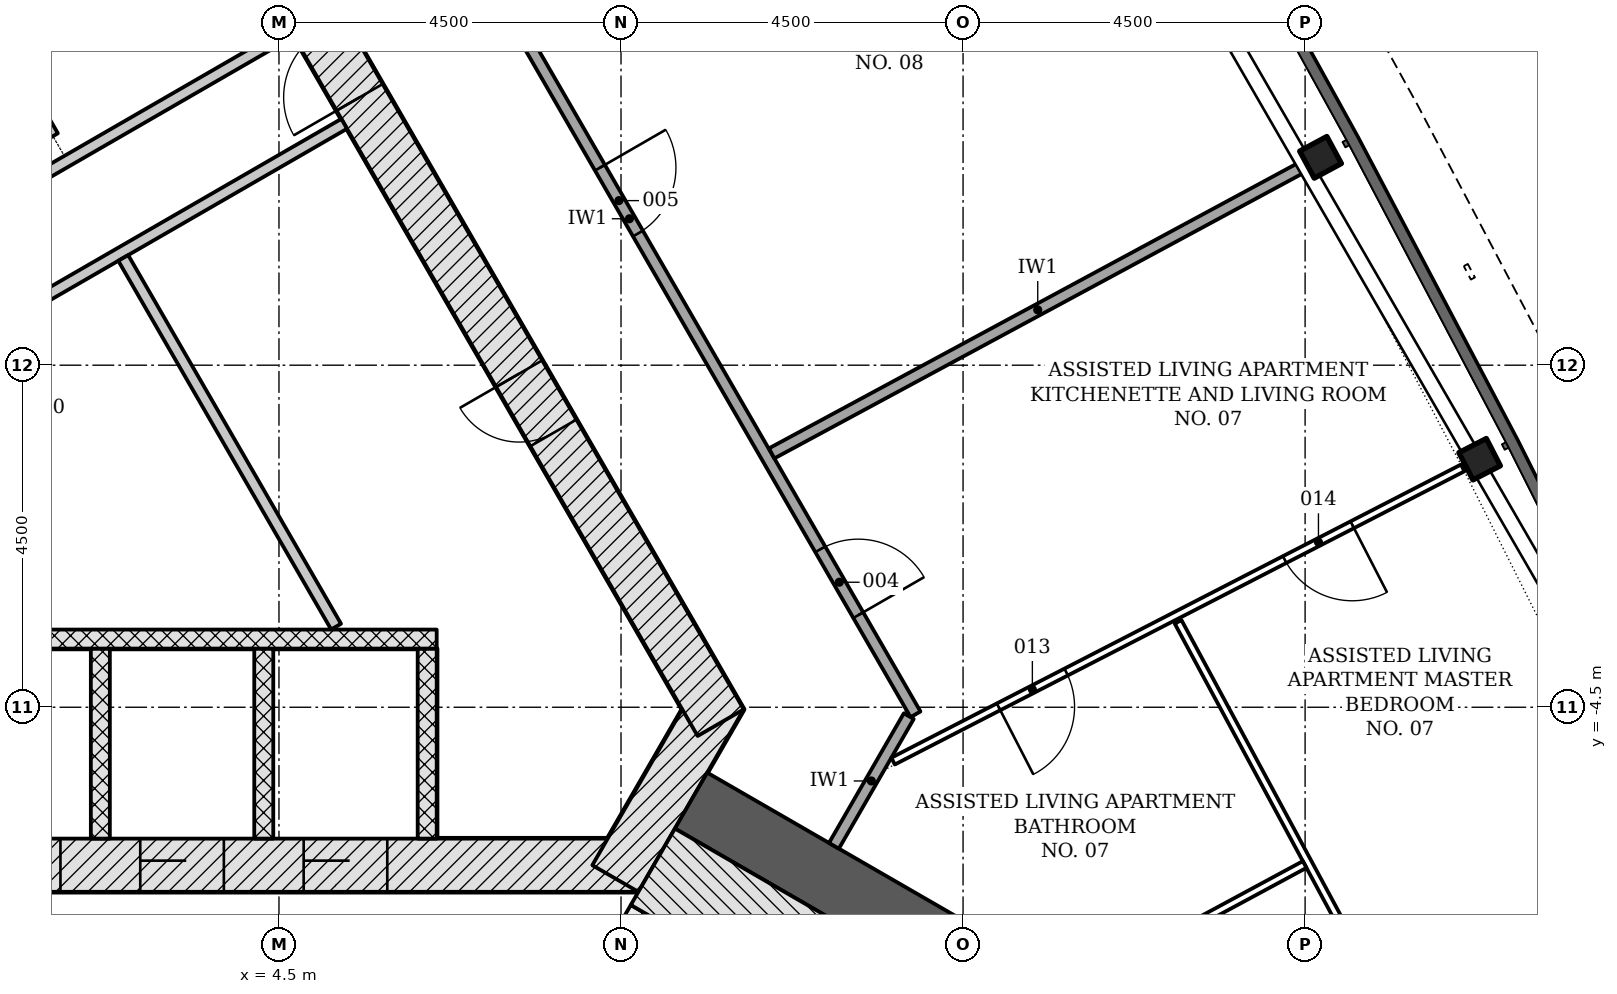
"""IFC4 building model, lengths in metres.
Left out: names, types, materials, properties, quantities, classifications, styles, units other than length and angle.
Written with IfcOpenShell. Run it as: python <this file> out.ifc"""

import sys

from ifc_helpers import new_model, si_unit, direction, frame, frame_2d, origin, origin_2d, place, context, subcontext, project, spatial, rectangle, i_section, extrude, element, fill, save


model = new_model("IFC4")
c1 = context("Model", 3, precision=1e-05, world=origin(), true_north=direction((0.0, 1.0)))
c2 = subcontext(c1, "Body", "Model", "MODEL_VIEW")
j1 = project(units=[si_unit("LENGTHUNIT", "METRE"), si_unit("PLANEANGLEUNIT", "RADIAN")], contexts=[c1])
p1 = place(None, origin())
s1 = spatial("IfcSite", under=j1, at=p1, CompositionType="ELEMENT")
p2 = place(p1, origin())
s2 = spatial("IfcBuilding", under=s1, at=p2, CompositionType="ELEMENT")
p3 = place(p2, frame((0.0, 0.0, 72.6)))
s3 = spatial("IfcBuildingStorey", under=s2, at=p3, CompositionType="ELEMENT", Elevation=72.6)
p4 = place(p3, frame((-9.229, -6.578, -0.2), z_axis=(0.0, 0.0, 1.0), x_axis=(1.0, 0.0, 0.0)))
e1 = element("IfcWall", 1, at=p4, inside=s3, PredefinedType="SHEAR", context=c2, shape_type="SweptSolid", body=[
    extrude(rectangle(XDim=18.458, YDim=0.7, at=frame_2d((9.229, 0.0))), origin(), (0.0, 0.0, 1.0), 3.6),
])
p5 = place(p4, frame((3.304, 0.0, 0.2)))
e2 = element("IfcOpeningElement", 2, at=p5, cuts=e1, PredefinedType="OPENING", context=c2, shape_type="SweptSolid", body=[
    extrude(rectangle(XDim=1.1, YDim=2.1, at=frame_2d((0.55, 1.05))), frame((0.0, 0.36, 0.0), z_axis=(0.0, -1.0, 0.0), x_axis=(1.0, 0.0, 0.0)), (0.0, 0.0, 1.0), 0.72),
])
p6 = place(p4, frame((5.454, 0.0, 0.2)))
e3 = element("IfcOpeningElement", 3, at=p6, cuts=e1, PredefinedType="OPENING", context=c2, shape_type="SweptSolid", body=[
    extrude(rectangle(XDim=1.1, YDim=2.1, at=frame_2d((0.55, 1.05))), frame((0.0, 0.36, 0.0), z_axis=(0.0, -1.0, 0.0), x_axis=(1.0, 0.0, 0.0)), (0.0, 0.0, 1.0), 0.72),
])
p7 = place(p4, frame((7.604, 0.0, 0.2)))
e4 = element("IfcOpeningElement", 4, at=p7, cuts=e1, PredefinedType="OPENING", context=c2, shape_type="SweptSolid", body=[
    extrude(rectangle(XDim=1.1, YDim=2.1, at=frame_2d((0.55, 1.05))), frame((0.0, 0.36, 0.0), z_axis=(0.0, -1.0, 0.0), x_axis=(1.0, 0.0, 0.0)), (0.0, 0.0, 1.0), 0.72),
])
p8 = place(p4, frame((9.754, 0.0, 0.2)))
e5 = element("IfcOpeningElement", 5, at=p8, cuts=e1, PredefinedType="OPENING", context=c2, shape_type="SweptSolid", body=[
    extrude(rectangle(XDim=1.1, YDim=2.1, at=frame_2d((0.55, 1.05))), frame((0.0, 0.36, 0.0), z_axis=(0.0, -1.0, 0.0), x_axis=(1.0, 0.0, 0.0)), (0.0, 0.0, 1.0), 0.72),
])
p9 = place(p4, frame((11.904, 0.0, 0.2)))
e6 = element("IfcOpeningElement", 6, at=p9, cuts=e1, PredefinedType="OPENING", context=c2, shape_type="SweptSolid", body=[
    extrude(rectangle(XDim=1.1, YDim=2.1, at=frame_2d((0.55, 1.05))), frame((0.0, 0.36, 0.0), z_axis=(0.0, -1.0, 0.0), x_axis=(1.0, 0.0, 0.0)), (0.0, 0.0, 1.0), 0.72),
])
p10 = place(p4, frame((14.054, 0.0, 0.2)))
e7 = element("IfcOpeningElement", 7, at=p10, cuts=e1, PredefinedType="OPENING", context=c2, shape_type="SweptSolid", body=[
    extrude(rectangle(XDim=1.1, YDim=2.1, at=frame_2d((0.55, 1.05))), frame((0.0, 0.36, 0.0), z_axis=(0.0, -1.0, 0.0), x_axis=(1.0, 0.0, 0.0)), (0.0, 0.0, 1.0), 0.72),
])
p11 = place(p4, frame((1.029, 0.0, 0.2)))
e8 = element("IfcOpeningElement", 8, at=p11, cuts=e1, PredefinedType="OPENING", context=c2, shape_type="SweptSolid", body=[
    extrude(rectangle(XDim=1.0, YDim=2.1, at=frame_2d((0.5, 1.05))), frame((0.0, 0.36, 0.0), z_axis=(0.0, -1.0, 0.0), x_axis=(1.0, 0.0, 0.0)), (0.0, 0.0, 1.0), 0.72),
])
p12 = place(p3, frame((8.926, -6.753, -0.2), z_axis=(0.0, 0.0, 1.0), x_axis=(0.500042739161, 0.866000726912, 0.0)))
e9 = element("IfcWall", 9, at=p12, inside=s3, PredefinedType="SHEAR", context=c2, shape_type="SweptSolid", body=[
    extrude(rectangle(XDim=2.771, YDim=0.7, at=frame_2d((1.386, 0.0))), origin(), (0.0, 0.0, 1.0), 3.6),
])
p13 = place(p3, frame((10.311, -4.703, -0.2), z_axis=(0.0, 0.0, 1.0), x_axis=(-0.500001446645, 0.866024568562, 0.0)))
e10 = element("IfcWall", 10, at=p13, inside=s3, PredefinedType="SHEAR", context=c2, shape_type="SweptSolid", body=[
    extrude(rectangle(XDim=18.458, YDim=0.7, at=frame_2d((9.229, 0.0))), origin(), (0.0, 0.0, 1.0), 3.6),
])
p14 = place(p13, frame((9.5, 0.0, 0.2)))
e11 = element("IfcOpeningElement", 11, at=p14, cuts=e10, PredefinedType="OPENING", context=c2, shape_type="SweptSolid", body=[
    extrude(rectangle(XDim=1.0, YDim=2.1, at=frame_2d((0.5, 1.05))), frame((0.0, 0.36, 0.0), z_axis=(0.0, -1.0, 0.0), x_axis=(1.0, 0.0, 0.0)), (0.0, 0.0, 1.0), 0.72),
])
p15 = place(p13, frame((4.402, 0.0, 0.2)))
e12 = element("IfcOpeningElement", 12, at=p15, cuts=e10, PredefinedType="OPENING", context=c2, shape_type="SweptSolid", body=[
    extrude(rectangle(XDim=0.9, YDim=2.1, at=frame_2d((0.45, 1.05))), frame((0.0, 0.36, 0.0), z_axis=(0.0, -1.0, 0.0), x_axis=(1.0, 0.0, 0.0)), (0.0, 0.0, 1.0), 0.72),
])
p16 = place(p13, frame((13.927, 0.0, 0.2)))
e13 = element("IfcOpeningElement", 13, at=p16, cuts=e10, PredefinedType="OPENING", context=c2, shape_type="SweptSolid", body=[
    extrude(rectangle(XDim=0.9, YDim=2.1, at=frame_2d((0.45, 1.05))), frame((0.0, 0.36, 0.0), z_axis=(0.0, -1.0, 0.0), x_axis=(1.0, 0.0, 0.0)), (0.0, 0.0, 1.0), 0.72),
])
p17 = place(p3, frame((9.922, -5.728, -0.2), z_axis=(0.0, 0.0, 1.0), x_axis=(0.866026077102, -0.499998833779, 0.0)))
e14 = element("IfcWall", 14, at=p17, inside=s3, PredefinedType="SHEAR", context=c2, shape_type="SweptSolid", body=[
    extrude(rectangle(XDim=13.381, YDim=0.85, at=frame_2d((6.691, 0.0))), origin(), (0.0, 0.0, 1.0), 3.6),
])
for number, where, z_axis, x_axis in (
    (15, (20.296, -1.237, -0.2), (0.0, 0.0, 1.0), (-0.458, 0.889, 0.0)),
    (16, (18.203, 2.735, -0.2), (0.0, 0.0, 1.0), (-0.475, 0.88, 0.0)),
):
    element("IfcColumn", number, at=place(p3, frame(where, z_axis=z_axis, x_axis=x_axis)), inside=s3, PredefinedType="COLUMN", context=c2, shape_type="SweptSolid", body=[
        extrude(i_section(OverallWidth=0.404, OverallDepth=0.406, WebThickness=0.027, FlangeThickness=0.044, FilletRadius=0.015, at=origin_2d()), origin(), (0.0, 0.0, 1.0), 3.6),
    ])
for number, where, z_axis, x_axis in (
    (17, (2.15, -6.228, -0.2), (0.0, 0.0, 1.0), (0.0, 1.0, 0.0)),
    (18, (4.3, -6.228, -0.2), (0.0, 0.0, 1.0), (0.0, 1.0, 0.0)),
    (19, (6.45, -6.228, -0.2), (0.0, 0.0, 1.0), (0.0, 1.0, 0.0)),
):
    element("IfcWall", number, at=place(p3, frame(where, z_axis=z_axis, x_axis=x_axis)), inside=s3, PredefinedType="PARTITIONING", context=c2, shape_type="SweptSolid", body=[
        extrude(rectangle(XDim=2.5, YDim=0.25, at=frame_2d((1.25, 0.0))), origin(), (0.0, 0.0, 1.0), 3.6),
    ])
p18 = place(p3, frame((-6.575, -3.603, 0.0), z_axis=(0.0, 0.0, 1.0), x_axis=(1.0, 0.0, 0.0)))
e20 = element("IfcWall", 20, at=p18, inside=s3, PredefinedType="PARTITIONING", context=c2, shape_type="SweptSolid", body=[
    extrude(rectangle(XDim=13.15, YDim=0.25, at=frame_2d((6.575, 0.0))), origin(), (0.0, 0.0, 1.0), 3.4),
])
p19 = place(p3, frame((-5.148, -2.89, 0.0), z_axis=(0.0, 0.0, 1.0), x_axis=(0.866030081544, 0.499991897794, 0.0)))
e21 = element("IfcWall", 21, at=p19, inside=s3, PredefinedType="PARTITIONING", context=c2, shape_type="SweptSolid", body=[
    extrude(rectangle(XDim=12.131, YDim=0.15, at=frame_2d((6.065, 0.0))), origin(), (0.0, 0.0, 1.0), 3.4),
])
p20 = place(p19, frame((5.831, 0.0, 0.0)))
e22 = element("IfcOpeningElement", 22, at=p20, cuts=e21, PredefinedType="OPENING", context=c2, shape_type="SweptSolid", body=[
    extrude(rectangle(XDim=0.9, YDim=2.1, at=frame_2d((0.45, 1.05))), frame((0.0, 0.085, 0.0), z_axis=(0.0, -1.0, 0.0), x_axis=(1.0, 0.0, 0.0)), (0.0, 0.0, 1.0), 0.17),
])
p21 = place(p19, frame((1.467, 0.0, 0.0)))
e23 = element("IfcOpeningElement", 23, at=p21, cuts=e21, PredefinedType="OPENING", context=c2, shape_type="SweptSolid", body=[
    extrude(rectangle(XDim=0.9, YDim=2.1, at=frame_2d((0.45, 1.05))), frame((0.0, 0.085, 0.0), z_axis=(0.0, -1.0, 0.0), x_axis=(1.0, 0.0, 0.0)), (0.0, 0.0, 1.0), 0.17),
])
p22 = place(p3, frame((-3.748, -0.465, 0.0), z_axis=(0.0, 0.0, 1.0), x_axis=(0.866033540873, 0.499985905884, 0.0)))
e24 = element("IfcWall", 24, at=p22, inside=s3, PredefinedType="PARTITIONING", context=c2, shape_type="SweptSolid", body=[
    extrude(rectangle(XDim=9.706, YDim=0.15, at=frame_2d((4.853, 0.0))), origin(), (0.0, 0.0, 1.0), 3.4),
])
p23 = place(p22, frame((2.704, 0.0, 0.0)))
e25 = element("IfcOpeningElement", 25, at=p23, cuts=e24, PredefinedType="OPENING", context=c2, shape_type="SweptSolid", body=[
    extrude(rectangle(XDim=0.9, YDim=2.1, at=frame_2d((0.45, 1.05))), frame((0.0, 0.085, 0.0), z_axis=(0.0, -1.0, 0.0), x_axis=(1.0, 0.0, 0.0)), (0.0, 0.0, 1.0), 0.17),
])
p24 = place(p3, frame((1.526, 3.013, 0.0), z_axis=(0.0, 0.0, 1.0), x_axis=(-0.499978925887, 0.866037570588, 0.0)))
e26 = element("IfcWall", 26, at=p24, inside=s3, PredefinedType="PARTITIONING", context=c2, shape_type="SweptSolid", body=[
    extrude(rectangle(XDim=3.296, YDim=0.15, at=frame_2d((1.648, 0.0))), origin(), (0.0, 0.0, 1.0), 3.4),
])
p25 = place(p3, frame((5.251, -3.439, 0.0), z_axis=(0.0, 0.0, 1.0), x_axis=(-0.500011755427, 0.866018616679, 0.0)))
e27 = element("IfcWall", 27, at=p25, inside=s3, PredefinedType="PARTITIONING", context=c2, shape_type="SweptSolid", body=[
    extrude(rectangle(XDim=5.6, YDim=0.15, at=frame_2d((2.8, 0.0))), origin(), (0.0, 0.0, 1.0), 3.4),
])
p26 = place(p3, frame((7.44, -10.226, -0.2), z_axis=(0.0, 0.0, 1.0), x_axis=(0.500022077904, 0.866012656725, 0.0)))
e28 = element("IfcWall", 28, at=p26, inside=s3, PredefinedType="SHEAR", context=c2, shape_type="SweptSolid", body=[
    extrude(rectangle(XDim=3.55, YDim=0.2, at=frame_2d((1.775, 0.0))), origin(), (0.0, 0.0, 1.0), 3.6),
])
p27 = place(p26, frame((1.175, 0.0, 0.2)))
e29 = element("IfcOpeningElement", 29, at=p27, cuts=e28, PredefinedType="OPENING", context=c2, shape_type="SweptSolid", body=[
    extrude(rectangle(XDim=1.2, YDim=2.1, at=frame_2d((0.6, 1.05))), frame((0.0, 0.11, 0.0), z_axis=(0.0, -1.0, 0.0), x_axis=(1.0, 0.0, 0.0)), (0.0, 0.0, 1.0), 0.22),
])
p28 = place(p3, frame((9.419, -6.599, -0.2), z_axis=(0.0, 0.0, 1.0), x_axis=(0.866033125095, -0.499986626058, 0.0)))
e30 = element("IfcWall", 30, at=p28, inside=s3, PredefinedType="SHEAR", context=c2, shape_type="SweptSolid", body=[
    extrude(rectangle(XDim=7.2, YDim=1.161, at=frame_2d((3.6, 0.0))), origin(), (0.0, 0.0, 1.0), 3.6),
])
p29 = place(p3, frame((5.346, 8.446, 0.0), z_axis=(0.0, 0.0, 1.0), x_axis=(0.500008781656, -0.866020333634, 0.0)))
e31 = element("IfcWall", 31, at=p29, inside=s3, PredefinedType="PARTITIONING", context=c2, shape_type="SweptSolid", body=[
    extrude(rectangle(XDim=15.057, YDim=0.15, at=frame_2d((7.528, 0.0))), origin(), (0.0, 0.0, 1.0), 2.778),
])
p30 = place(p29, frame((12.55, 0.0, 0.0)))
e32 = element("IfcOpeningElement", 32, at=p30, cuts=e31, PredefinedType="OPENING", context=c2, shape_type="SweptSolid", body=[
    extrude(rectangle(XDim=1.0, YDim=2.1, at=frame_2d((0.5, 1.05))), frame((0.0, 0.085, 0.0), z_axis=(0.0, -1.0, 0.0), x_axis=(1.0, 0.0, 0.0)), (0.0, 0.0, 1.0), 0.17),
])
p31 = place(p29, frame((6.753, 0.0, 0.0)))
e33 = element("IfcOpeningElement", 33, at=p31, cuts=e31, PredefinedType="OPENING", context=c2, shape_type="SweptSolid", body=[
    extrude(rectangle(XDim=1.0, YDim=2.1, at=frame_2d((0.5, 1.05))), frame((0.0, 0.085, 0.0), z_axis=(0.0, -1.0, 0.0), x_axis=(1.0, 0.0, 0.0)), (0.0, 0.0, 1.0), 0.17),
])
p32 = place(p3, frame((11.801, -6.323, 0.0), z_axis=(0.0, 0.0, 1.0), x_axis=(0.500058665202, 0.865991530765, 0.0)))
e34 = element("IfcWall", 34, at=p32, inside=s3, PredefinedType="PARTITIONING", context=c2, shape_type="SweptSolid", body=[
    extrude(rectangle(XDim=1.969, YDim=0.15, at=frame_2d((0.985, 0.0))), origin(), (0.0, 0.0, 1.0), 2.778),
])
p33 = place(p3, frame((17.983, 2.616, 0.0), z_axis=(0.0, 0.0, 1.0), x_axis=(-0.880118053528, -0.474754896608, 0.0)))
e35 = element("IfcWall", 35, at=p33, inside=s3, PredefinedType="PARTITIONING", context=c2, shape_type="SweptSolid", body=[
    extrude(rectangle(XDim=7.955, YDim=0.15, at=frame_2d((3.978, 0.0))), origin(), (0.0, 0.0, 1.0), 2.778),
])
p34 = place(p3, frame((20.646, -11.38, 0.0), z_axis=(0.0, 0.0, 1.0), x_axis=(-0.474727306664, 0.880132935588, 0.0)))
e36 = element("IfcWall", 36, at=p34, inside=s3, PredefinedType="PARTITIONING", context=c2, shape_type="SweptSolid", body=[
    extrude(rectangle(XDim=9.094, YDim=0.1, at=frame_2d((4.547, 0.0))), origin(), (0.0, 0.0, 1.0), 2.778),
])
p35 = place(p34, frame((2.222, 0.0, 0.0)))
e37 = element("IfcOpeningElement", 37, at=p35, cuts=e36, PredefinedType="OPENING", context=c2, shape_type="SweptSolid", body=[
    extrude(rectangle(XDim=1.0, YDim=2.1, at=frame_2d((0.5, 1.05))), frame((0.0, 0.06, 0.0), z_axis=(0.0, -1.0, 0.0), x_axis=(1.0, 0.0, 0.0)), (0.0, 0.0, 1.0), 0.12),
])
p36 = place(p3, frame((20.074, -1.351, 0.0), z_axis=(0.0, 0.0, 1.0), x_axis=(-0.88912315758, -0.457668013582, 0.0)))
e38 = element("IfcWall", 38, at=p36, inside=s3, PredefinedType="PARTITIONING", context=c2, shape_type="SweptSolid", body=[
    extrude(rectangle(XDim=8.429, YDim=0.1, at=frame_2d((4.214, 0.0))), origin(), (0.0, 0.0, 1.0), 2.778),
])
p37 = place(p36, frame((5.868, 0.0, 0.0)))
e39 = element("IfcOpeningElement", 39, at=p37, cuts=e38, PredefinedType="OPENING", context=c2, shape_type="SweptSolid", body=[
    extrude(rectangle(XDim=1.0, YDim=2.1, at=frame_2d((0.5, 1.05))), frame((0.0, 0.06, 0.0), z_axis=(0.0, -1.0, 0.0), x_axis=(1.0, 0.0, 0.0)), (0.0, 0.0, 1.0), 0.12),
])
p38 = place(p36, frame((1.635, 0.0, 0.0)))
e40 = element("IfcOpeningElement", 40, at=p38, cuts=e38, PredefinedType="OPENING", context=c2, shape_type="SweptSolid", body=[
    extrude(rectangle(XDim=1.0, YDim=2.1, at=frame_2d((0.5, 1.05))), frame((0.0, 0.06, 0.0), z_axis=(0.0, -1.0, 0.0), x_axis=(1.0, 0.0, 0.0)), (0.0, 0.0, 1.0), 0.12),
])
p39 = place(p3, frame((17.994, -6.569, 0.0), z_axis=(0.0, 0.0, 1.0), x_axis=(-0.880148573472, -0.474698313263, 0.0)))
e41 = element("IfcWall", 41, at=p39, inside=s3, PredefinedType="PARTITIONING", context=c2, shape_type="SweptSolid", body=[
    extrude(rectangle(XDim=3.356, YDim=0.1, at=frame_2d((1.678, 0.0))), origin(), (0.0, 0.0, 1.0), 3.4),
])
p40 = place(p8, origin())
e42 = element("IfcDoor", 42, at=p40, inside=s3, OperationType="DOUBLE_DOOR_SLIDING", PredefinedType="DOOR", context=c2, shape_type="SweptSolid", body=[
    extrude(rectangle(XDim=1.1, YDim=2.1, at=frame_2d((0.55, 1.05))), frame((0.0, 0.025, 0.0), z_axis=(0.0, -1.0, 0.0), x_axis=(1.0, 0.0, 0.0)), (0.0, 0.0, 1.0), 0.05),
])
fill(e5, e42)
p41 = place(p9, origin())
e43 = element("IfcDoor", 43, at=p41, inside=s3, OperationType="DOUBLE_DOOR_SLIDING", PredefinedType="DOOR", context=c2, shape_type="SweptSolid", body=[
    extrude(rectangle(XDim=1.1, YDim=2.1, at=frame_2d((0.55, 1.05))), frame((0.0, 0.025, 0.0), z_axis=(0.0, -1.0, 0.0), x_axis=(1.0, 0.0, 0.0)), (0.0, 0.0, 1.0), 0.05),
])
fill(e6, e43)
p42 = place(p10, origin())
e44 = element("IfcDoor", 44, at=p42, inside=s3, OperationType="DOUBLE_DOOR_SLIDING", PredefinedType="DOOR", context=c2, shape_type="SweptSolid", body=[
    extrude(rectangle(XDim=1.1, YDim=2.1, at=frame_2d((0.55, 1.05))), frame((0.0, 0.025, 0.0), z_axis=(0.0, -1.0, 0.0), x_axis=(1.0, 0.0, 0.0)), (0.0, 0.0, 1.0), 0.05),
])
fill(e7, e44)
p43 = place(p14, origin())
e45 = element("IfcDoor", 45, at=p43, inside=s3, OperationType="SINGLE_SWING_LEFT", PredefinedType="DOOR", context=c2, shape_type="SweptSolid", body=[
    extrude(rectangle(XDim=1.0, YDim=2.1, at=frame_2d((0.5, 1.05))), frame((0.0, 0.075, 0.0), z_axis=(0.0, -1.0, 0.0), x_axis=(1.0, 0.0, 0.0)), (0.0, 0.0, 1.0), 0.15),
])
fill(e11, e45)
p44 = place(p15, origin())
e46 = element("IfcDoor", 46, at=p44, inside=s3, OperationType="SINGLE_SWING_RIGHT", PredefinedType="DOOR", context=c2, shape_type="SweptSolid", body=[
    extrude(rectangle(XDim=0.9, YDim=2.1, at=frame_2d((0.45, 1.05))), frame((0.0, 0.075, 0.0), z_axis=(0.0, -1.0, 0.0), x_axis=(1.0, 0.0, 0.0)), (0.0, 0.0, 1.0), 0.15),
])
fill(e12, e46)
p45 = place(p30, origin())
e47 = element("IfcDoor", 47, at=p45, inside=s3, OperationType="SINGLE_SWING_RIGHT", PredefinedType="DOOR", context=c2, shape_type="SweptSolid", body=[
    extrude(rectangle(XDim=1.0, YDim=2.1, at=frame_2d((0.5, 1.05))), frame((0.0, 0.025, 0.0), z_axis=(0.0, -1.0, 0.0), x_axis=(1.0, 0.0, 0.0)), (0.0, 0.0, 1.0), 0.05),
])
fill(e32, e47)
p46 = place(p31, origin())
e48 = element("IfcDoor", 48, at=p46, inside=s3, OperationType="SINGLE_SWING_LEFT", PredefinedType="DOOR", context=c2, shape_type="SweptSolid", body=[
    extrude(rectangle(XDim=1.0, YDim=2.1, at=frame_2d((0.5, 1.05))), frame((0.0, 0.025, 0.0), z_axis=(0.0, -1.0, 0.0), x_axis=(1.0, 0.0, 0.0)), (0.0, 0.0, 1.0), 0.05),
])
fill(e33, e48)
p47 = place(p37, origin())
e49 = element("IfcDoor", 49, at=p47, inside=s3, OperationType="SINGLE_SWING_RIGHT", PredefinedType="DOOR", context=c2, shape_type="SweptSolid", body=[
    extrude(rectangle(XDim=1.0, YDim=2.1, at=frame_2d((0.5, 1.05))), frame((0.0, 0.025, 0.0), z_axis=(0.0, -1.0, 0.0), x_axis=(1.0, 0.0, 0.0)), (0.0, 0.0, 1.0), 0.05),
])
fill(e39, e49)
p48 = place(p38, origin())
e50 = element("IfcDoor", 50, at=p48, inside=s3, OperationType="SINGLE_SWING_LEFT", PredefinedType="DOOR", context=c2, shape_type="SweptSolid", body=[
    extrude(rectangle(XDim=1.0, YDim=2.1, at=frame_2d((0.5, 1.05))), frame((0.0, 0.025, 0.0), z_axis=(0.0, -1.0, 0.0), x_axis=(1.0, 0.0, 0.0)), (0.0, 0.0, 1.0), 0.05),
])
fill(e40, e50)
save(model, sys.argv[1])
